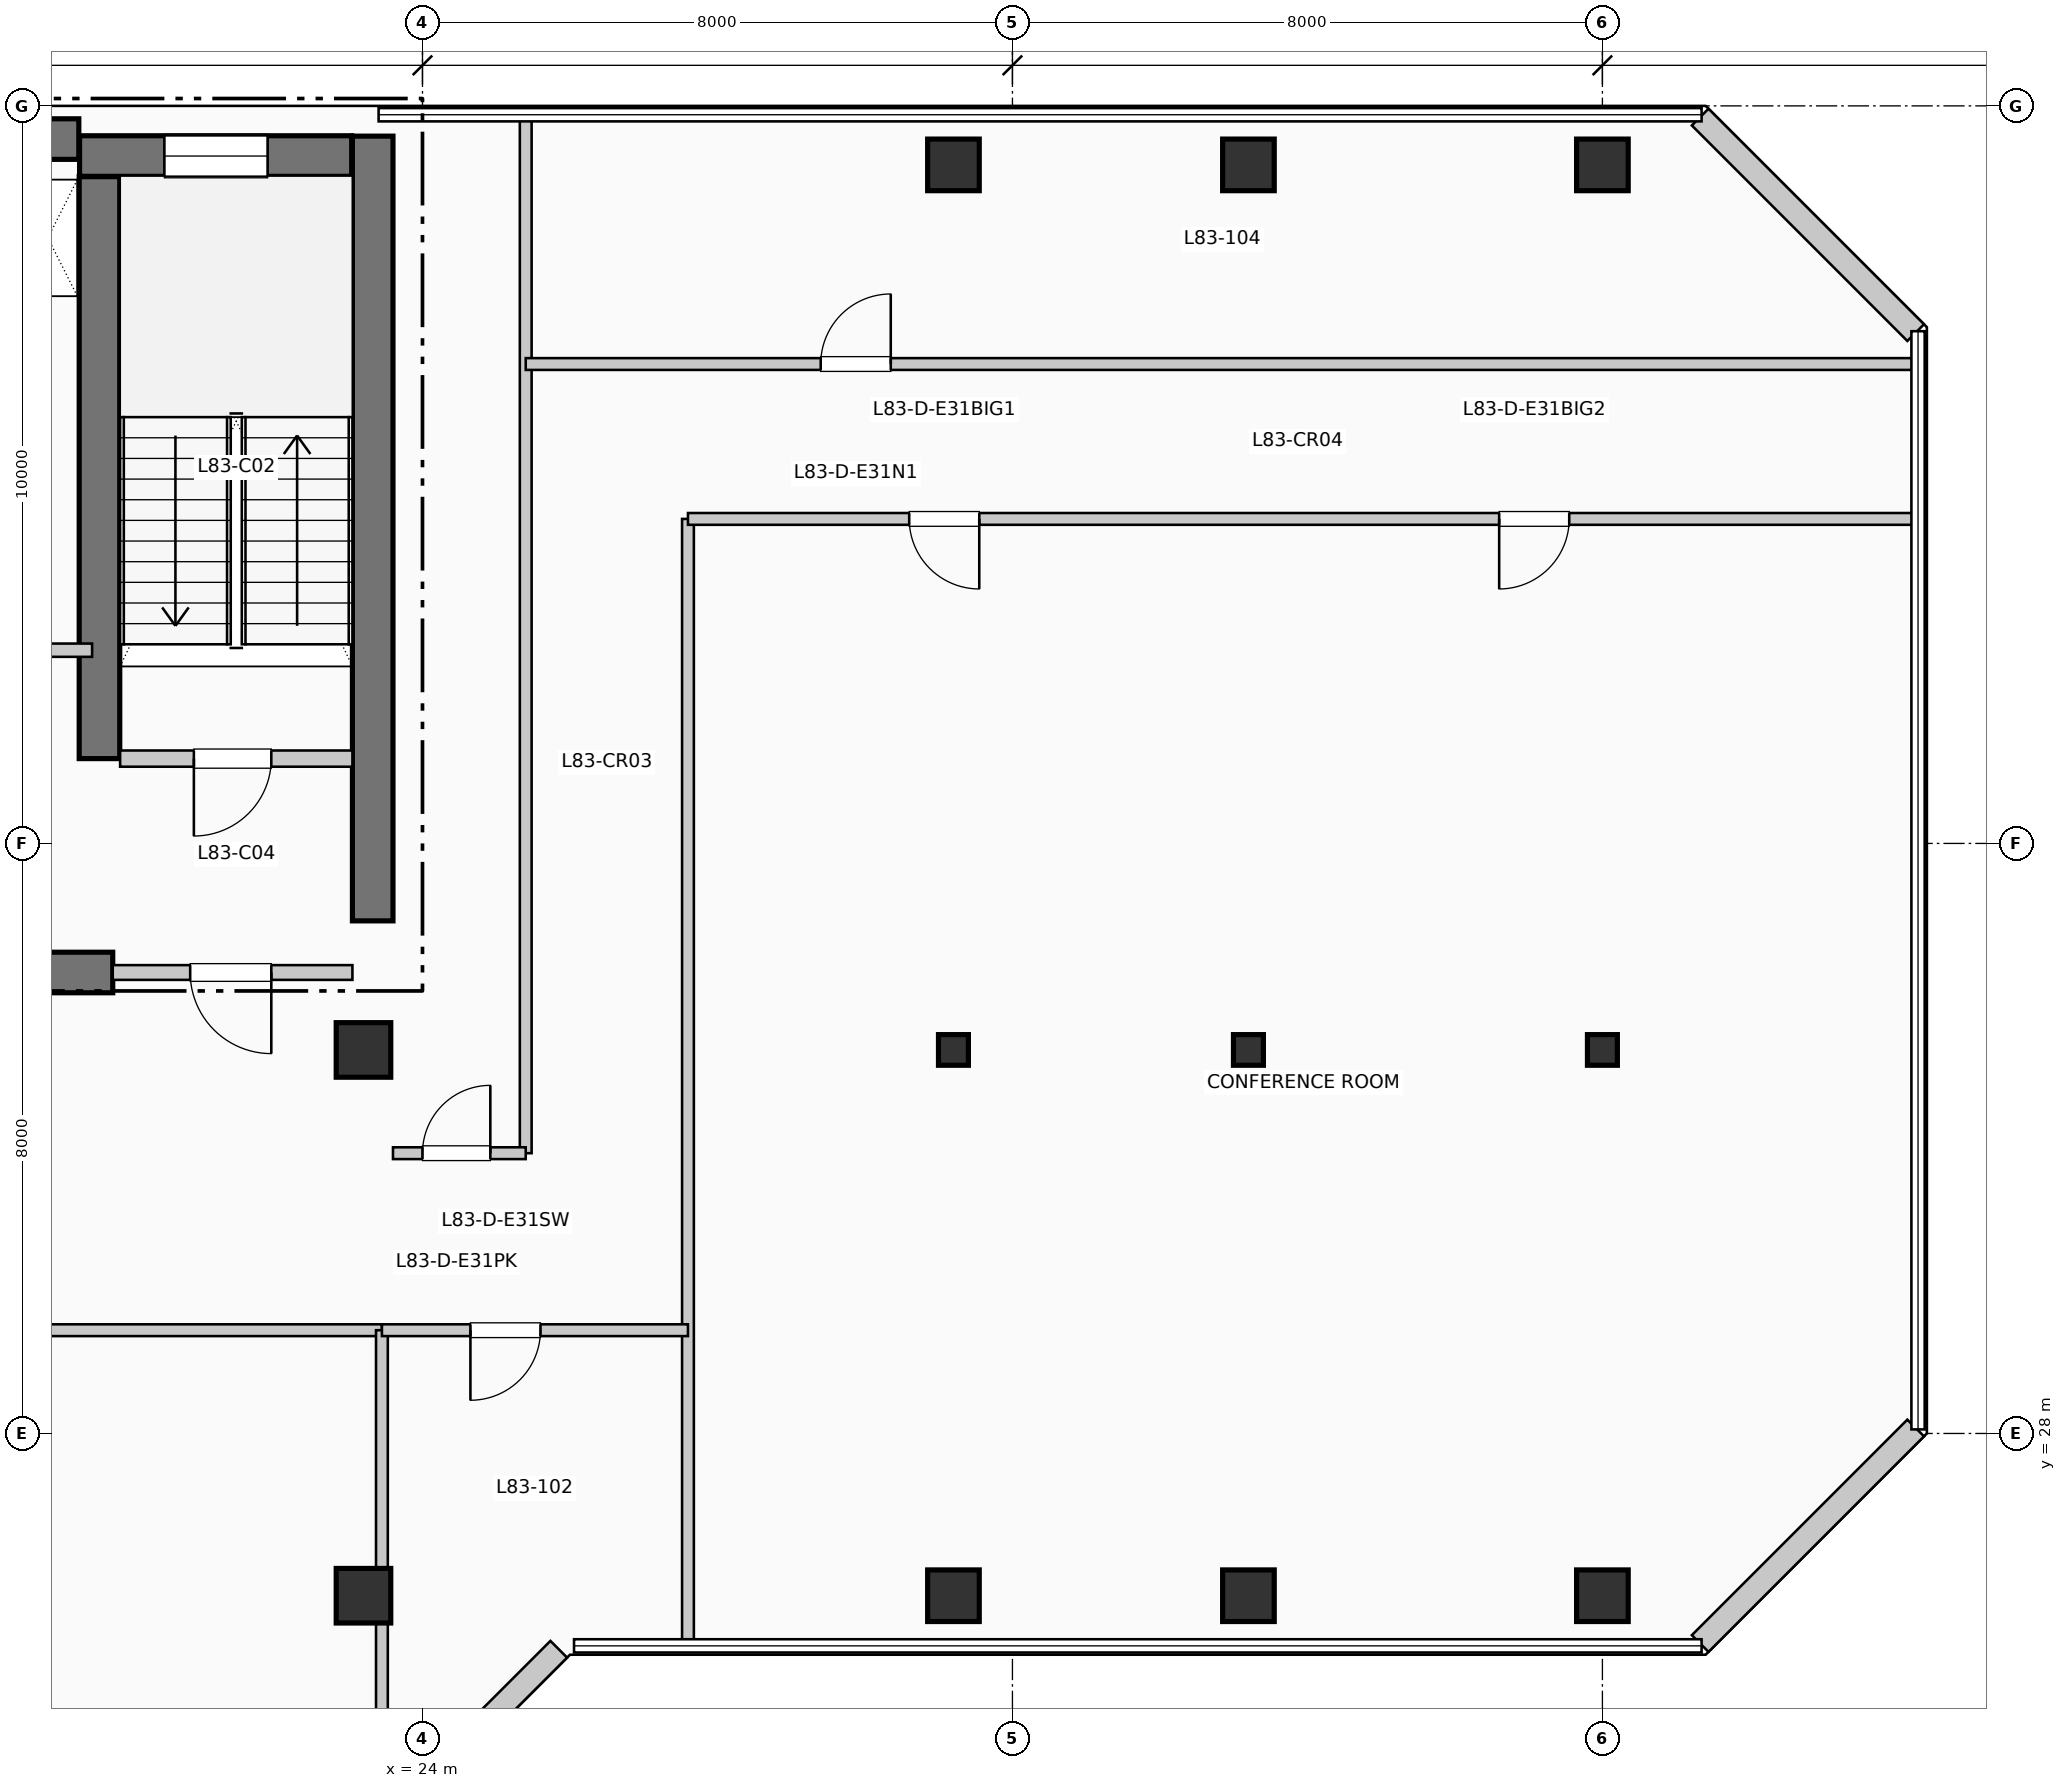
"""IFC4 building model, lengths in metres.
Left out: names, types, materials, properties, quantities, classifications, styles, units other than length and angle.
Written with IfcOpenShell. Run it as: python <this file> out.ifc"""

import sys

from ifc_helpers import new_model, si_unit, direction, frame, frame_2d, origin, origin_2d, place, context, subcontext, project, spatial, rectangle, i_section, extrude, element, fill, save


model = new_model("IFC4")
c1 = context("Model", 3, precision=1e-05, world=origin(), true_north=direction((0.0, 1.0)))
c2 = subcontext(c1, "Body", "Model", "MODEL_VIEW")
j1 = project(units=[si_unit("LENGTHUNIT", "METRE"), si_unit("PLANEANGLEUNIT", "RADIAN")], contexts=[c1])
p1 = place(None, origin())
s1 = spatial("IfcSite", under=j1, at=p1, CompositionType="ELEMENT")
p2 = place(p1, origin())
s2 = spatial("IfcBuilding", under=s1, at=p2, CompositionType="ELEMENT")
p3 = place(p2, frame((0.0, 0.0, 339.57)))
s3 = spatial("IfcBuildingStorey", under=s2, at=p3, CompositionType="ELEMENT", Elevation=339.57)
p4 = place(p3, frame((5.36, 45.55, 0.0), z_axis=(0.0, 0.0, 1.0), x_axis=(1.0, 0.0, 0.0)))
e1 = element("IfcWall", 1, at=p4, inside=s3, PredefinedType="SHEAR", context=c2, shape_type="SweptSolid", body=[
    extrude(rectangle(XDim=13.98, YDim=0.55, at=frame_2d((6.99, 0.0))), origin(), (0.0, 0.0, 1.0), 3.96),
])
p5 = place(p3, frame((23.325, 34.95, 0.0), z_axis=(0.0, 0.0, 1.0), x_axis=(0.0, 1.0, 0.0)))
e2 = element("IfcWall", 2, at=p5, inside=s3, PredefinedType="SHEAR", context=c2, shape_type="SweptSolid", body=[
    extrude(rectangle(XDim=10.64, YDim=0.55, at=frame_2d((5.32, 0.0))), origin(), (0.0, 0.0, 1.0), 3.96),
])
p6 = place(p3, frame((13.68, 34.25, 0.0), z_axis=(0.0, 0.0, 1.0), x_axis=(1.0, 0.0, 0.0)))
e3 = element("IfcWall", 3, at=p6, inside=s3, PredefinedType="SHEAR", context=c2, shape_type="SweptSolid", body=[
    extrude(rectangle(XDim=6.12, YDim=0.55, at=frame_2d((3.06, 0.0))), origin(), (0.0, 0.0, 1.0), 3.96),
])
p7 = place(p3, frame((19.62, 37.15, 0.0), z_axis=(0.0, 0.0, 1.0), x_axis=(0.0, 1.0, 0.0)))
e4 = element("IfcWall", 4, at=p7, inside=s3, PredefinedType="SHEAR", context=c2, shape_type="SweptSolid", body=[
    extrude(rectangle(XDim=7.89, YDim=0.55, at=frame_2d((3.945, 0.0))), origin(), (0.0, 0.0, 1.0), 3.96),
])
p8 = place(p3, frame((19.35, 45.32, 0.0), z_axis=(0.0, 0.0, 1.0), x_axis=(1.0, 0.0, 0.0)))
e5 = element("IfcWall", 5, at=p8, inside=s3, PredefinedType="SHEAR", context=c2, shape_type="SweptSolid", body=[
    extrude(rectangle(XDim=3.69, YDim=0.55, at=frame_2d((1.845, 0.0))), origin(), (0.0, 0.0, 1.0), 3.96),
])
p9 = place(p8, frame((1.15, 0.0, 1.05)))
e6 = element("IfcOpeningElement", 6, at=p9, cuts=e5, PredefinedType="OPENING", context=c2, shape_type="SweptSolid", body=[
    extrude(rectangle(XDim=1.4, YDim=1.8, at=frame_2d((0.7, 0.9))), frame((0.0, 0.285, 0.0), z_axis=(0.0, -1.0, 0.0), x_axis=(1.0, 0.0, 0.0)), (0.0, 0.0, 1.0), 0.57),
])
for number, where, z_axis, x_axis in (
    (7, (23.2, 25.8, 0.0), (0.0, 0.0, 1.0), (1.0, 0.0, 0.0)),
    (8, (23.2, 33.2, 0.0), (0.0, 0.0, 1.0), (1.0, 0.0, 0.0)),
):
    element("IfcColumn", number, at=place(p3, frame(where, z_axis=z_axis, x_axis=x_axis)), inside=s3, PredefinedType="COLUMN", context=c2, shape_type="SweptSolid", body=[
        extrude(rectangle(XDim=0.74, YDim=0.74, at=origin_2d()), origin(), (0.0, 0.0, 1.0), 3.96),
    ])
p10 = place(p3, frame((31.2, 25.8, 0.0), z_axis=(0.0, 0.0, 1.0), x_axis=(1.0, 0.0, 0.0)))
e9 = element("IfcColumn", 9, at=p10, inside=s3, PredefinedType="COLUMN", context=c2, shape_type="SweptSolid", body=[
    extrude(rectangle(XDim=0.7, YDim=0.7, at=origin_2d()), origin(), (0.0, 0.0, 1.0), 3.96),
])
p11 = place(p3, frame((31.2, 33.2, 0.0), z_axis=(0.0, 0.0, 1.0), x_axis=(1.0, 0.0, 0.0)))
e10 = element("IfcColumn", 10, at=p11, inside=s3, PredefinedType="COLUMN", context=c2, shape_type="SweptSolid", body=[
    extrude(i_section(OverallWidth=0.406, OverallDepth=0.416, WebThickness=0.022, FlangeThickness=0.036, at=origin_2d()), origin(), (0.0, 0.0, 1.0), 3.96),
])
for number, where, z_axis, x_axis in (
    (11, (31.2, 45.2, 0.0), (0.0, 0.0, 1.0), (1.0, 0.0, 0.0)),
    (12, (35.2, 25.8, 0.0), (0.0, 0.0, 1.0), (1.0, 0.0, 0.0)),
):
    element("IfcColumn", number, at=place(p3, frame(where, z_axis=z_axis, x_axis=x_axis)), inside=s3, PredefinedType="COLUMN", context=c2, shape_type="SweptSolid", body=[
        extrude(rectangle(XDim=0.7, YDim=0.7, at=origin_2d()), origin(), (0.0, 0.0, 1.0), 3.96),
    ])
p12 = place(p3, frame((35.2, 33.2, 0.0), z_axis=(0.0, 0.0, 1.0), x_axis=(1.0, 0.0, 0.0)))
e13 = element("IfcColumn", 13, at=p12, inside=s3, PredefinedType="COLUMN", context=c2, shape_type="SweptSolid", body=[
    extrude(i_section(OverallWidth=0.406, OverallDepth=0.416, WebThickness=0.022, FlangeThickness=0.036, at=origin_2d()), origin(), (0.0, 0.0, 1.0), 3.96),
])
for number, where, z_axis, x_axis in (
    (14, (35.2, 45.2, 0.0), (0.0, 0.0, 1.0), (1.0, 0.0, 0.0)),
    (15, (40.0, 25.8, 0.0), (0.0, 0.0, 1.0), (1.0, 0.0, 0.0)),
):
    element("IfcColumn", number, at=place(p3, frame(where, z_axis=z_axis, x_axis=x_axis)), inside=s3, PredefinedType="COLUMN", context=c2, shape_type="SweptSolid", body=[
        extrude(rectangle(XDim=0.7, YDim=0.7, at=origin_2d()), origin(), (0.0, 0.0, 1.0), 3.96),
    ])
p13 = place(p3, frame((40.0, 33.2, 0.0), z_axis=(0.0, 0.0, 1.0), x_axis=(1.0, 0.0, 0.0)))
e16 = element("IfcColumn", 16, at=p13, inside=s3, PredefinedType="COLUMN", context=c2, shape_type="SweptSolid", body=[
    extrude(i_section(OverallWidth=0.406, OverallDepth=0.416, WebThickness=0.022, FlangeThickness=0.036, at=origin_2d()), origin(), (0.0, 0.0, 1.0), 3.96),
])
p14 = place(p3, frame((40.0, 45.2, 0.0), z_axis=(0.0, 0.0, 1.0), x_axis=(1.0, 0.0, 0.0)))
e17 = element("IfcColumn", 17, at=p14, inside=s3, PredefinedType="COLUMN", context=c2, shape_type="SweptSolid", body=[
    extrude(rectangle(XDim=0.7, YDim=0.7, at=origin_2d()), origin(), (0.0, 0.0, 1.0), 3.96),
])
p15 = place(p3, frame((23.926, 23.152, 0.0), z_axis=(0.0, 0.0, 1.0), x_axis=(0.707106781187, 0.707106781187, 0.0)))
e18 = element("IfcWall", 18, at=p15, inside=s3, PredefinedType="SOLIDWALL", context=c2, shape_type="SweptSolid", body=[
    extrude(rectangle(XDim=2.718, YDim=0.32, at=frame_2d((1.359, 0.0))), origin(), (0.0, 0.0, 1.0), 3.74),
])
for number, where, z_axis, x_axis in (
    (19, (41.326, 25.152, 0.0), (0.0, 0.0, 1.0), (0.707, 0.707, 0.0)),
    (20, (44.248, 42.926, 0.0), (0.0, 0.0, 1.0), (-0.707, 0.707, 0.0)),
):
    element("IfcWall", number, at=place(p3, frame(where, z_axis=z_axis, x_axis=x_axis)), inside=s3, PredefinedType="SOLIDWALL", context=c2, shape_type="SweptSolid", body=[
        extrude(rectangle(XDim=4.133, YDim=0.32, at=frame_2d((2.066, 0.0))), origin(), (0.0, 0.0, 1.0), 3.74),
    ])
p16 = place(p3, frame((19.9, 37.15, 0.0), z_axis=(0.0, 0.0, 1.0), x_axis=(1.0, 0.0, 0.0)))
e21 = element("IfcWall", 21, at=p16, inside=s3, PredefinedType="PARTITIONING", context=c2, shape_type="SweptSolid", body=[
    extrude(rectangle(XDim=3.15, YDim=0.22, at=frame_2d((1.575, 0.0))), origin(), (0.0, 0.0, 1.0), 3.74),
])
p17 = place(p16, frame((2.05, 0.0, 0.0), z_axis=(0.0, 0.0, 1.0), x_axis=(-1.0, 0.0, 0.0)))
e22 = element("IfcOpeningElement", 22, at=p17, cuts=e21, PredefinedType="OPENING", context=c2, shape_type="SweptSolid", body=[
    extrude(rectangle(XDim=1.05, YDim=2.15, at=frame_2d((0.525, 1.075))), frame((0.0, 0.12, 0.0), z_axis=(0.0, -1.0, 0.0), x_axis=(1.0, 0.0, 0.0)), (0.0, 0.0, 1.0), 0.24),
])
p18 = place(p3, frame((19.8, 34.25, 0.0), z_axis=(0.0, 0.0, 1.0), x_axis=(1.0, 0.0, 0.0)))
e23 = element("IfcWall", 23, at=p18, inside=s3, PredefinedType="PARTITIONING", context=c2, shape_type="SweptSolid", body=[
    extrude(rectangle(XDim=3.25, YDim=0.2, at=frame_2d((1.625, 0.0))), origin(), (0.0, 0.0, 1.0), 3.74),
])
p19 = place(p18, frame((2.15, 0.0, 0.0), z_axis=(0.0, 0.0, 1.0), x_axis=(-1.0, 0.0, 0.0)))
e24 = element("IfcOpeningElement", 24, at=p19, cuts=e23, PredefinedType="OPENING", context=c2, shape_type="SweptSolid", body=[
    extrude(rectangle(XDim=1.1, YDim=2.15, at=frame_2d((0.55, 1.075))), frame((0.0, 0.11, 0.0), z_axis=(0.0, -1.0, 0.0), x_axis=(1.0, 0.0, 0.0)), (0.0, 0.0, 1.0), 0.22),
])
p20 = place(p3, frame((17.68, 38.62, 0.0), z_axis=(0.0, 0.0, 1.0), x_axis=(1.0, 0.0, 0.0)))
e25 = element("IfcWall", 25, at=p20, inside=s3, PredefinedType="PARTITIONING", context=c2, shape_type="SweptSolid", body=[
    extrude(rectangle(XDim=1.84, YDim=0.18, at=frame_2d((0.92, 0.0))), origin(), (0.0, 0.0, 1.0), 3.74),
])
p21 = place(p20, frame((0.24, 0.0, 0.0)))
e26 = element("IfcOpeningElement", 26, at=p21, cuts=e25, PredefinedType="OPENING", context=c2, shape_type="SweptSolid", body=[
    extrude(rectangle(XDim=0.92, YDim=2.1, at=frame_2d((0.46, 1.05))), frame((0.0, 0.1, 0.0), z_axis=(0.0, -1.0, 0.0), x_axis=(1.0, 0.0, 0.0)), (0.0, 0.0, 1.0), 0.2),
])
p22 = place(p3, frame((6.4, 29.4, 0.0), z_axis=(0.0, 0.0, 1.0), x_axis=(1.0, 0.0, 0.0)))
e27 = element("IfcWall", 27, at=p22, inside=s3, PredefinedType="PARTITIONING", context=c2, shape_type="SweptSolid", body=[
    extrude(rectangle(XDim=17.05, YDim=0.16, at=frame_2d((8.525, 0.0))), origin(), (0.0, 0.0, 1.0), 3.425),
])
p23 = place(p3, frame((23.45, 6.84, 0.0), z_axis=(0.0, 0.0, 1.0), x_axis=(0.0, 1.0, 0.0)))
e28 = element("IfcWall", 28, at=p23, inside=s3, PredefinedType="PARTITIONING", context=c2, shape_type="SweptSolid", body=[
    extrude(rectangle(XDim=22.56, YDim=0.16, at=frame_2d((11.28, 0.0))), origin(), (0.0, 0.0, 1.0), 3.175),
])
p24 = place(p3, frame((25.4, 31.8, 0.0), z_axis=(0.0, 0.0, 1.0), x_axis=(0.0, 1.0, 0.0)))
e29 = element("IfcWall", 29, at=p24, inside=s3, PredefinedType="PARTITIONING", context=c2, shape_type="SweptSolid", body=[
    extrude(rectangle(XDim=14.01, YDim=0.16, at=frame_2d((7.005, 0.0))), origin(), (0.0, 0.0, 1.0), 3.74),
])
p25 = place(p3, frame((27.6, 25.19, 0.0), z_axis=(0.0, 0.0, 1.0), x_axis=(0.0, 1.0, 0.0)))
e30 = element("IfcWall", 30, at=p25, inside=s3, PredefinedType="PARTITIONING", context=c2, shape_type="SweptSolid", body=[
    extrude(rectangle(XDim=15.21, YDim=0.16, at=frame_2d((7.605, 0.0))), origin(), (0.0, 0.0, 1.0), 3.74),
])
p26 = place(p3, frame((23.45, 29.4, 0.0), z_axis=(0.0, 0.0, 1.0), x_axis=(1.0, 0.0, 0.0)))
e31 = element("IfcWall", 31, at=p26, inside=s3, PredefinedType="PARTITIONING", context=c2, shape_type="SweptSolid", body=[
    extrude(rectangle(XDim=4.15, YDim=0.16, at=frame_2d((2.075, 0.0))), origin(), (0.0, 0.0, 1.0), 3.425),
])
p27 = place(p26, frame((2.15, 0.0, 0.0), z_axis=(0.0, 0.0, 1.0), x_axis=(-1.0, 0.0, 0.0)))
e32 = element("IfcOpeningElement", 32, at=p27, cuts=e31, PredefinedType="OPENING", context=c2, shape_type="SweptSolid", body=[
    extrude(rectangle(XDim=0.95, YDim=2.15, at=frame_2d((0.475, 1.075))), frame((0.0, 0.09, 0.0), z_axis=(0.0, -1.0, 0.0), x_axis=(1.0, 0.0, 0.0)), (0.0, 0.0, 1.0), 0.18),
])
p28 = place(p3, frame((27.6, 40.4, 0.0), z_axis=(0.0, 0.0, 1.0), x_axis=(1.0, 0.0, 0.0)))
e33 = element("IfcWall", 33, at=p28, inside=s3, PredefinedType="PARTITIONING", context=c2, shape_type="SweptSolid", body=[
    extrude(rectangle(XDim=16.61, YDim=0.16, at=frame_2d((8.305, 0.0))), origin(), (0.0, 0.0, 1.0), 3.74),
])
p29 = place(p28, frame((3.95, 0.0, 0.0), z_axis=(0.0, 0.0, 1.0), x_axis=(-1.0, 0.0, 0.0)))
e34 = element("IfcOpeningElement", 34, at=p29, cuts=e33, PredefinedType="OPENING", context=c2, shape_type="SweptSolid", body=[
    extrude(rectangle(XDim=0.95, YDim=2.15, at=frame_2d((0.475, 1.075))), frame((0.0, 0.09, 0.0), z_axis=(0.0, -1.0, 0.0), x_axis=(1.0, 0.0, 0.0)), (0.0, 0.0, 1.0), 0.18),
])
p30 = place(p28, frame((11.95, 0.0, 0.0), z_axis=(0.0, 0.0, 1.0), x_axis=(-1.0, 0.0, 0.0)))
e35 = element("IfcOpeningElement", 35, at=p30, cuts=e33, PredefinedType="OPENING", context=c2, shape_type="SweptSolid", body=[
    extrude(rectangle(XDim=0.95, YDim=2.15, at=frame_2d((0.475, 1.075))), frame((0.0, 0.09, 0.0), z_axis=(0.0, -1.0, 0.0), x_axis=(1.0, 0.0, 0.0)), (0.0, 0.0, 1.0), 0.18),
])
p31 = place(p3, frame((25.4, 42.5, 0.0), z_axis=(0.0, 0.0, 1.0), x_axis=(1.0, 0.0, 0.0)))
e36 = element("IfcWall", 36, at=p31, inside=s3, PredefinedType="PARTITIONING", context=c2, shape_type="SweptSolid", body=[
    extrude(rectangle(XDim=18.81, YDim=0.16, at=frame_2d((9.405, 0.0))), origin(), (0.0, 0.0, 1.0), 3.74),
])
p32 = place(p31, frame((4.0, 0.0, 0.0)))
e37 = element("IfcOpeningElement", 37, at=p32, cuts=e36, PredefinedType="OPENING", context=c2, shape_type="SweptSolid", body=[
    extrude(rectangle(XDim=0.95, YDim=2.15, at=frame_2d((0.475, 1.075))), frame((0.0, 0.09, 0.0), z_axis=(0.0, -1.0, 0.0), x_axis=(1.0, 0.0, 0.0)), (0.0, 0.0, 1.0), 0.18),
])
p33 = place(p3, frame((23.6, 31.8, 0.0), z_axis=(0.0, 0.0, 1.0), x_axis=(1.0, 0.0, 0.0)))
e38 = element("IfcWall", 38, at=p33, inside=s3, PredefinedType="PARTITIONING", context=c2, shape_type="SweptSolid", body=[
    extrude(rectangle(XDim=1.8, YDim=0.16, at=frame_2d((0.9, 0.0))), origin(), (0.0, 0.0, 1.0), 3.74),
])
p34 = place(p33, frame((0.4, 0.0, 0.0)))
e39 = element("IfcOpeningElement", 39, at=p34, cuts=e38, PredefinedType="OPENING", context=c2, shape_type="SweptSolid", body=[
    extrude(rectangle(XDim=0.92, YDim=2.1, at=frame_2d((0.46, 1.05))), frame((0.0, 0.09, 0.0), z_axis=(0.0, -1.0, 0.0), x_axis=(1.0, 0.0, 0.0)), (0.0, 0.0, 1.0), 0.18),
])
p35 = place(p9, origin())
e40 = element("IfcWindow", 40, at=p35, inside=s3, PartitioningType="SINGLE_PANEL", PredefinedType="WINDOW", context=c2, shape_type="SweptSolid", body=[
    extrude(rectangle(XDim=1.4, YDim=1.8, at=frame_2d((0.7, 0.9))), frame((0.0, 0.03, 0.0), z_axis=(0.0, -1.0, 0.0), x_axis=(1.0, 0.0, 0.0)), (0.0, 0.0, 1.0), 0.06),
])
fill(e6, e40)
p36 = place(p17, origin())
e41 = element("IfcDoor", 41, at=p36, inside=s3, OperationType="SINGLE_SWING_LEFT", PredefinedType="DOOR", context=c2, shape_type="SweptSolid", body=[
    extrude(rectangle(XDim=1.05, YDim=2.15, at=frame_2d((0.525, 1.075))), frame((0.0, 0.025, 0.0), z_axis=(0.0, -1.0, 0.0), x_axis=(1.0, 0.0, 0.0)), (0.0, 0.0, 1.0), 0.05),
])
fill(e22, e41)
p37 = place(p19, origin())
e42 = element("IfcDoor", 42, at=p37, inside=s3, OperationType="SINGLE_SWING_RIGHT", PredefinedType="DOOR", context=c2, shape_type="SweptSolid", body=[
    extrude(rectangle(XDim=1.1, YDim=2.15, at=frame_2d((0.55, 1.075))), frame((0.0, 0.025, 0.0), z_axis=(0.0, -1.0, 0.0), x_axis=(1.0, 0.0, 0.0)), (0.0, 0.0, 1.0), 0.05),
])
fill(e24, e42)
p38 = place(p34, origin())
e43 = element("IfcDoor", 43, at=p38, inside=s3, OperationType="SINGLE_SWING_RIGHT", PredefinedType="DOOR", context=c2, shape_type="SweptSolid", body=[
    extrude(rectangle(XDim=0.92, YDim=2.1, at=frame_2d((0.46, 1.05))), frame((0.0, 0.025, 0.0), z_axis=(0.0, -1.0, 0.0), x_axis=(1.0, 0.0, 0.0)), (0.0, 0.0, 1.0), 0.05),
])
fill(e39, e43)
p39 = place(p27, origin())
e44 = element("IfcDoor", 44, at=p39, inside=s3, OperationType="SINGLE_SWING_LEFT", PredefinedType="DOOR", context=c2, shape_type="SweptSolid", body=[
    extrude(rectangle(XDim=0.95, YDim=2.15, at=frame_2d((0.475, 1.075))), frame((0.0, 0.025, 0.0), z_axis=(0.0, -1.0, 0.0), x_axis=(1.0, 0.0, 0.0)), (0.0, 0.0, 1.0), 0.05),
])
fill(e32, e44)
p40 = place(p29, origin())
e45 = element("IfcDoor", 45, at=p40, inside=s3, OperationType="SINGLE_SWING_RIGHT", PredefinedType="DOOR", context=c2, shape_type="SweptSolid", body=[
    extrude(rectangle(XDim=0.95, YDim=2.15, at=frame_2d((0.475, 1.075))), frame((0.0, 0.025, 0.0), z_axis=(0.0, -1.0, 0.0), x_axis=(1.0, 0.0, 0.0)), (0.0, 0.0, 1.0), 0.05),
])
fill(e34, e45)
p41 = place(p30, origin())
e46 = element("IfcDoor", 46, at=p41, inside=s3, OperationType="SINGLE_SWING_LEFT", PredefinedType="DOOR", context=c2, shape_type="SweptSolid", body=[
    extrude(rectangle(XDim=0.95, YDim=2.15, at=frame_2d((0.475, 1.075))), frame((0.0, 0.025, 0.0), z_axis=(0.0, -1.0, 0.0), x_axis=(1.0, 0.0, 0.0)), (0.0, 0.0, 1.0), 0.05),
])
fill(e35, e46)
p42 = place(p32, origin())
e47 = element("IfcDoor", 47, at=p42, inside=s3, OperationType="SINGLE_SWING_RIGHT", PredefinedType="DOOR", context=c2, shape_type="SweptSolid", body=[
    extrude(rectangle(XDim=0.95, YDim=2.15, at=frame_2d((0.475, 1.075))), frame((0.0, 0.025, 0.0), z_axis=(0.0, -1.0, 0.0), x_axis=(1.0, 0.0, 0.0)), (0.0, 0.0, 1.0), 0.05),
])
fill(e37, e47)
save(model, sys.argv[1])
